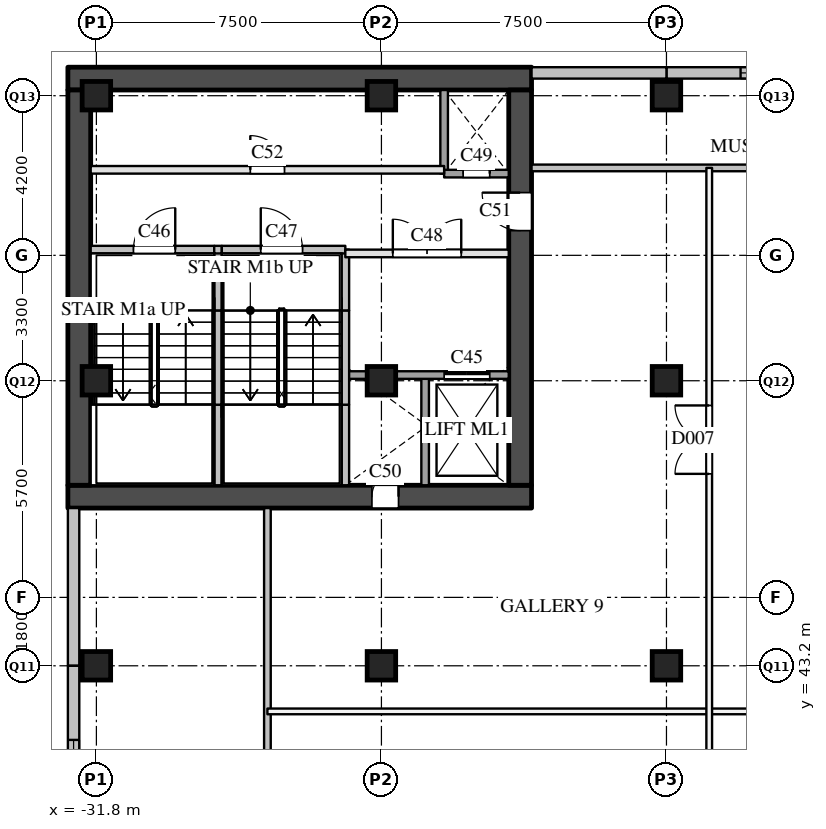
"""IFC4 building model, lengths in metres.
Left out: names, types, materials, properties, quantities, classifications, styles, units other than length and angle.
Written with IfcOpenShell. Run it as: python <this file> out.ifc"""

import sys

from ifc_helpers import new_model, si_unit, direction, frame, frame_2d, origin, origin_2d, place, context, subcontext, project, spatial, rectangle, extrude, element, fill, save


model = new_model("IFC4")
c1 = context("Model", 3, precision=1e-05, world=origin(), true_north=direction((0.0, 1.0)))
c2 = subcontext(c1, "Body", "Model", "MODEL_VIEW")
j1 = project(units=[si_unit("LENGTHUNIT", "METRE"), si_unit("PLANEANGLEUNIT", "RADIAN")], contexts=[c1])
p1 = place(None, origin())
s1 = spatial("IfcSite", under=j1, at=p1, CompositionType="ELEMENT")
p2 = place(p1, origin())
s2 = spatial("IfcBuilding", under=s1, at=p2, CompositionType="ELEMENT")
p3 = place(p2, frame((0.0, 0.0, 8.0)))
s3 = spatial("IfcBuildingStorey", under=s2, at=p3, CompositionType="ELEMENT", Elevation=8.0)
for number, where, z_axis, x_axis in (
    (1, (-31.8, 43.2, 0.0), (0.0, 0.0, 1.0), (1.0, 0.0, 0.0)),
    (2, (-31.8, 50.7, 0.0), (0.0, 0.0, 1.0), (1.0, 0.0, 0.0)),
    (3, (-31.8, 58.2, 0.0), (0.0, 0.0, 1.0), (1.0, 0.0, 0.0)),
    (4, (-24.3, 43.2, 0.0), (0.0, 0.0, 1.0), (1.0, 0.0, 0.0)),
    (5, (-24.3, 50.7, 0.0), (0.0, 0.0, 1.0), (1.0, 0.0, 0.0)),
    (6, (-24.3, 58.2, 0.0), (0.0, 0.0, 1.0), (1.0, 0.0, 0.0)),
    (7, (-16.8, 43.2, 0.0), (0.0, 0.0, 1.0), (1.0, 0.0, 0.0)),
    (8, (-16.8, 50.7, 0.0), (0.0, 0.0, 1.0), (1.0, 0.0, 0.0)),
    (9, (-16.8, 58.2, 0.0), (0.0, 0.0, 1.0), (1.0, 0.0, 0.0)),
):
    element("IfcColumn", number, at=place(p3, frame(where, z_axis=z_axis, x_axis=x_axis)), inside=s3, PredefinedType="COLUMN", context=c2, shape_type="SweptSolid", body=[
        extrude(rectangle(XDim=0.75, YDim=0.75, at=origin_2d()), origin(), (0.0, 0.0, 1.0), 6.0),
    ])
p4 = place(p3, frame((-9.3, 58.8, 0.0), z_axis=(0.0, 0.0, 1.0), x_axis=(-1.0, 0.0, 0.0)))
e10 = element("IfcWall", 10, at=p4, inside=s3, PredefinedType="SOLIDWALL", context=c2, shape_type="SweptSolid", body=[
    extrude(rectangle(XDim=7.5, YDim=0.3, at=frame_2d((3.75, 0.0))), origin(), (0.0, 0.0, 1.0), 5.59),
])
p5 = place(p4, frame((1.95, 0.0, 2.4)))
e11 = element("IfcOpeningElement", 11, at=p5, cuts=e10, PredefinedType="OPENING", context=c2, shape_type="SweptSolid", body=[
    extrude(rectangle(XDim=3.6, YDim=1.2, at=frame_2d((1.8, 0.6))), frame((0.0, 0.16, 0.0), z_axis=(0.0, -1.0, 0.0), x_axis=(1.0, 0.0, 0.0)), (0.0, 0.0, 1.0), 0.32),
])
p6 = place(p3, frame((-16.8, 58.8, 0.0), z_axis=(0.0, 0.0, 1.0), x_axis=(-1.0, 0.0, 0.0)))
e12 = element("IfcWall", 12, at=p6, inside=s3, PredefinedType="SOLIDWALL", context=c2, shape_type="SweptSolid", body=[
    extrude(rectangle(XDim=3.55, YDim=0.3, at=frame_2d((1.775, 0.0))), origin(), (0.0, 0.0, 1.0), 5.59),
])
p7 = place(p3, frame((-32.4, 47.35, 0.0), z_axis=(0.0, 0.0, 1.0), x_axis=(0.0, -1.0, 0.0)))
e13 = element("IfcWall", 13, at=p7, inside=s3, PredefinedType="SOLIDWALL", context=c2, shape_type="SweptSolid", body=[
    extrude(rectangle(XDim=4.15, YDim=0.3, at=frame_2d((2.075, 0.0))), origin(), (0.0, 0.0, 1.0), 5.59),
])
p8 = place(p3, frame((-32.4, 43.2, 0.0), z_axis=(0.0, 0.0, 1.0), x_axis=(0.0, -1.0, 0.0)))
e14 = element("IfcWall", 14, at=p8, inside=s3, PredefinedType="SOLIDWALL", context=c2, shape_type="SweptSolid", body=[
    extrude(rectangle(XDim=7.5, YDim=0.3, at=frame_2d((3.75, 0.0))), origin(), (0.0, 0.0, 1.0), 5.59),
])
p9 = place(p8, frame((1.95, 0.0, 2.4)))
e15 = element("IfcOpeningElement", 15, at=p9, cuts=e14, PredefinedType="OPENING", context=c2, shape_type="SweptSolid", body=[
    extrude(rectangle(XDim=3.6, YDim=1.2, at=frame_2d((1.8, 0.6))), frame((0.0, 0.16, 0.0), z_axis=(0.0, -1.0, 0.0), x_axis=(1.0, 0.0, 0.0)), (0.0, 0.0, 1.0), 0.32),
])
p10 = place(p3, frame((-32.55, 47.65, 0.0), z_axis=(0.0, 0.0, 1.0), x_axis=(1.0, 0.0, 0.0)))
e16 = element("IfcWall", 16, at=p10, inside=s3, PredefinedType="SHEAR", context=c2, shape_type="SweptSolid", body=[
    extrude(rectangle(XDim=12.2, YDim=0.6, at=frame_2d((6.1, 0.0))), origin(), (0.0, 0.0, 1.0), 5.59),
])
p11 = place(p10, frame((8.0, 0.0, 0.0)))
e17 = element("IfcOpeningElement", 17, at=p11, cuts=e16, PredefinedType="OPENING", context=c2, shape_type="SweptSolid", body=[
    extrude(rectangle(XDim=0.7, YDim=2.1, at=frame_2d((0.35, 1.05))), frame((0.0, 0.31, 0.0), z_axis=(0.0, -1.0, 0.0), x_axis=(1.0, 0.0, 0.0)), (0.0, 0.0, 1.0), 0.62),
])
p12 = place(p3, frame((-32.55, 58.65, 0.0), z_axis=(0.0, 0.0, 1.0), x_axis=(1.0, 0.0, 0.0)))
e18 = element("IfcWall", 18, at=p12, inside=s3, PredefinedType="SHEAR", context=c2, shape_type="SweptSolid", body=[
    extrude(rectangle(XDim=12.2, YDim=0.6, at=frame_2d((6.1, 0.0))), origin(), (0.0, 0.0, 1.0), 5.59),
])
p13 = place(p3, frame((-32.25, 47.95, 0.0), z_axis=(0.0, 0.0, 1.0), x_axis=(0.0, 1.0, 0.0)))
e19 = element("IfcWall", 19, at=p13, inside=s3, PredefinedType="SHEAR", context=c2, shape_type="SweptSolid", body=[
    extrude(rectangle(XDim=10.4, YDim=0.6, at=frame_2d((5.2, 0.0))), origin(), (0.0, 0.0, 1.0), 5.59),
])
p14 = place(p3, frame((-20.65, 47.95, 0.0), z_axis=(0.0, 0.0, 1.0), x_axis=(0.0, 1.0, 0.0)))
e20 = element("IfcWall", 20, at=p14, inside=s3, PredefinedType="SHEAR", context=c2, shape_type="SweptSolid", body=[
    extrude(rectangle(XDim=10.4, YDim=0.6, at=frame_2d((5.2, 0.0))), origin(), (0.0, 0.0, 1.0), 5.59),
])
p15 = place(p14, frame((6.7, 0.0, 0.0)))
e21 = element("IfcOpeningElement", 21, at=p15, cuts=e20, PredefinedType="OPENING", context=c2, shape_type="SweptSolid", body=[
    extrude(rectangle(XDim=1.0, YDim=2.1, at=frame_2d((0.5, 1.05))), frame((0.0, 0.31, 0.0), z_axis=(0.0, -1.0, 0.0), x_axis=(1.0, 0.0, 0.0)), (0.0, 0.0, 1.0), 0.62),
])
p16 = place(p3, frame((-28.6, 47.95, 0.0), z_axis=(0.0, 0.0, 1.0), x_axis=(0.0, 1.0, 0.0)))
e22 = element("IfcWall", 22, at=p16, inside=s3, PredefinedType="SOLIDWALL", context=c2, shape_type="SweptSolid", body=[
    extrude(rectangle(XDim=2.12, YDim=0.2, at=frame_2d((1.06, 0.0))), origin(), (0.0, 0.0, 1.0), 5.59),
])
p17 = place(p3, frame((-28.6, 50.07, 0.0), z_axis=(0.0, 0.0, 1.0), x_axis=(0.0, 1.0, 0.0)))
e23 = element("IfcWall", 23, at=p17, inside=s3, PredefinedType="SOLIDWALL", context=c2, shape_type="SweptSolid", body=[
    extrude(rectangle(XDim=2.48, YDim=0.2, at=frame_2d((1.24, 0.0))), origin(), (0.0, 0.0, 1.0), 5.59),
])
p18 = place(p3, frame((-28.6, 52.55, 0.0), z_axis=(0.0, 0.0, 1.0), x_axis=(0.0, 1.0, 0.0)))
e24 = element("IfcWall", 24, at=p18, inside=s3, PredefinedType="SOLIDWALL", context=c2, shape_type="SweptSolid", body=[
    extrude(rectangle(XDim=1.6, YDim=0.2, at=frame_2d((0.8, 0.0))), origin(), (0.0, 0.0, 1.0), 5.59),
])
p19 = place(p3, frame((-25.25, 47.95, 0.0), z_axis=(0.0, 0.0, 1.0), x_axis=(0.0, 1.0, 0.0)))
e25 = element("IfcWall", 25, at=p19, inside=s3, PredefinedType="SOLIDWALL", context=c2, shape_type="SweptSolid", body=[
    extrude(rectangle(XDim=2.12, YDim=0.2, at=frame_2d((1.06, 0.0))), origin(), (0.0, 0.0, 1.0), 5.59),
])
p20 = place(p3, frame((-25.25, 50.07, 0.0), z_axis=(0.0, 0.0, 1.0), x_axis=(0.0, 1.0, 0.0)))
e26 = element("IfcWall", 26, at=p20, inside=s3, PredefinedType="SOLIDWALL", context=c2, shape_type="SweptSolid", body=[
    extrude(rectangle(XDim=2.48, YDim=0.2, at=frame_2d((1.24, 0.0))), origin(), (0.0, 0.0, 1.0), 5.59),
])
p21 = place(p3, frame((-25.25, 52.55, 0.0), z_axis=(0.0, 0.0, 1.0), x_axis=(0.0, 1.0, 0.0)))
e27 = element("IfcWall", 27, at=p21, inside=s3, PredefinedType="SOLIDWALL", context=c2, shape_type="SweptSolid", body=[
    extrude(rectangle(XDim=1.6, YDim=0.2, at=frame_2d((0.8, 0.0))), origin(), (0.0, 0.0, 1.0), 5.59),
])
p22 = place(p3, frame((-23.15, 47.95, 0.0), z_axis=(0.0, 0.0, 1.0), x_axis=(0.0, 1.0, 0.0)))
e28 = element("IfcWall", 28, at=p22, inside=s3, PredefinedType="SOLIDWALL", context=c2, shape_type="SweptSolid", body=[
    extrude(rectangle(XDim=2.9, YDim=0.2, at=frame_2d((1.45, 0.0))), origin(), (0.0, 0.0, 1.0), 5.59),
])
p23 = place(p3, frame((-22.65, 56.15, 0.0), z_axis=(0.0, 0.0, 1.0), x_axis=(0.0, 1.0, 0.0)))
e29 = element("IfcWall", 29, at=p23, inside=s3, PredefinedType="SOLIDWALL", context=c2, shape_type="SweptSolid", body=[
    extrude(rectangle(XDim=2.2, YDim=0.2, at=frame_2d((1.1, 0.0))), origin(), (0.0, 0.0, 1.0), 5.59),
])
p24 = place(p3, frame((-25.25, 50.85, 0.0), z_axis=(0.0, 0.0, 1.0), x_axis=(1.0, 0.0, 0.0)))
e30 = element("IfcWall", 30, at=p24, inside=s3, PredefinedType="SOLIDWALL", context=c2, shape_type="SweptSolid", body=[
    extrude(rectangle(XDim=4.3, YDim=0.2, at=frame_2d((2.15, 0.0))), origin(), (0.0, 0.0, 1.0), 5.59),
])
p25 = place(p24, frame((2.6, 0.0, 0.0)))
e31 = element("IfcOpeningElement", 31, at=p25, cuts=e30, PredefinedType="OPENING", context=c2, shape_type="SweptSolid", body=[
    extrude(rectangle(XDim=1.2, YDim=2.1, at=frame_2d((0.6, 1.05))), frame((0.0, 0.11, 0.0), z_axis=(0.0, -1.0, 0.0), x_axis=(1.0, 0.0, 0.0)), (0.0, 0.0, 1.0), 0.22),
])
p26 = place(p3, frame((-25.25, 54.05, 0.0), z_axis=(0.0, 0.0, 1.0), x_axis=(1.0, 0.0, 0.0)))
e32 = element("IfcWall", 32, at=p26, inside=s3, PredefinedType="PARTITIONING", context=c2, shape_type="SweptSolid", body=[
    extrude(rectangle(XDim=4.3, YDim=0.2, at=frame_2d((2.15, 0.0))), origin(), (0.0, 0.0, 1.0), 5.59),
])
p27 = place(p26, frame((1.25, 0.0, 0.0)))
e33 = element("IfcOpeningElement", 33, at=p27, cuts=e32, PredefinedType="OPENING", context=c2, shape_type="SweptSolid", body=[
    extrude(rectangle(XDim=1.8, YDim=2.1, at=frame_2d((0.9, 1.05))), frame((0.0, 0.11, 0.0), z_axis=(0.0, -1.0, 0.0), x_axis=(1.0, 0.0, 0.0)), (0.0, 0.0, 1.0), 0.22),
])
p28 = place(p3, frame((-31.95, 54.15, 0.0), z_axis=(0.0, 0.0, 1.0), x_axis=(1.0, 0.0, 0.0)))
e34 = element("IfcWall", 34, at=p28, inside=s3, PredefinedType="SOLIDWALL", context=c2, shape_type="SweptSolid", body=[
    extrude(rectangle(XDim=3.25, YDim=0.2, at=frame_2d((1.625, 0.0))), origin(), (0.0, 0.0, 1.0), 5.59),
])
p29 = place(p28, frame((1.125, 0.0, 0.0)))
e35 = element("IfcOpeningElement", 35, at=p29, cuts=e34, PredefinedType="OPENING", context=c2, shape_type="SweptSolid", body=[
    extrude(rectangle(XDim=1.1, YDim=2.1, at=frame_2d((0.55, 1.05))), frame((0.0, 0.11, 0.0), z_axis=(0.0, -1.0, 0.0), x_axis=(1.0, 0.0, 0.0)), (0.0, 0.0, 1.0), 0.22),
])
p30 = place(p3, frame((-28.7, 54.15, 0.0), z_axis=(0.0, 0.0, 1.0), x_axis=(1.0, 0.0, 0.0)))
e36 = element("IfcWall", 36, at=p30, inside=s3, PredefinedType="SOLIDWALL", context=c2, shape_type="SweptSolid", body=[
    extrude(rectangle(XDim=0.2, YDim=0.2, at=frame_2d((0.1, 0.0))), origin(), (0.0, 0.0, 1.0), 5.59),
])
p31 = place(p3, frame((-28.5, 54.15, 0.0), z_axis=(0.0, 0.0, 1.0), x_axis=(1.0, 0.0, 0.0)))
e37 = element("IfcWall", 37, at=p31, inside=s3, PredefinedType="SOLIDWALL", context=c2, shape_type="SweptSolid", body=[
    extrude(rectangle(XDim=3.25, YDim=0.2, at=frame_2d((1.625, 0.0))), origin(), (0.0, 0.0, 1.0), 5.59),
])
p32 = place(p31, frame((1.025, 0.0, 0.0)))
e38 = element("IfcOpeningElement", 38, at=p32, cuts=e37, PredefinedType="OPENING", context=c2, shape_type="SweptSolid", body=[
    extrude(rectangle(XDim=1.1, YDim=2.1, at=frame_2d((0.55, 1.05))), frame((0.0, 0.11, 0.0), z_axis=(0.0, -1.0, 0.0), x_axis=(1.0, 0.0, 0.0)), (0.0, 0.0, 1.0), 0.22),
])
p33 = place(p3, frame((-31.95, 56.25, 0.0), z_axis=(0.0, 0.0, 1.0), x_axis=(1.0, 0.0, 0.0)))
e39 = element("IfcWall", 39, at=p33, inside=s3, PredefinedType="PARTITIONING", context=c2, shape_type="SweptSolid", body=[
    extrude(rectangle(XDim=9.3, YDim=0.2, at=frame_2d((4.65, 0.0))), origin(), (0.0, 0.0, 1.0), 5.59),
])
p34 = place(p33, frame((4.2, 0.0, 0.0)))
e40 = element("IfcOpeningElement", 40, at=p34, cuts=e39, PredefinedType="OPENING", context=c2, shape_type="SweptSolid", body=[
    extrude(rectangle(XDim=0.9, YDim=2.1, at=frame_2d((0.45, 1.05))), frame((0.0, 0.11, 0.0), z_axis=(0.0, -1.0, 0.0), x_axis=(1.0, 0.0, 0.0)), (0.0, 0.0, 1.0), 0.22),
])
p35 = place(p3, frame((-22.65, 56.15, 0.0), z_axis=(0.0, 0.0, 1.0), x_axis=(1.0, 0.0, 0.0)))
e41 = element("IfcWall", 41, at=p35, inside=s3, PredefinedType="SOLIDWALL", context=c2, shape_type="SweptSolid", body=[
    extrude(rectangle(XDim=1.7, YDim=0.2, at=frame_2d((0.85, 0.0))), origin(), (0.0, 0.0, 1.0), 5.59),
])
p36 = place(p35, frame((0.5, 0.0, 0.0)))
e42 = element("IfcOpeningElement", 42, at=p36, cuts=e41, PredefinedType="OPENING", context=c2, shape_type="SweptSolid", body=[
    extrude(rectangle(XDim=0.7, YDim=2.1, at=frame_2d((0.35, 1.05))), frame((0.0, 0.11, 0.0), z_axis=(0.0, -1.0, 0.0), x_axis=(1.0, 0.0, 0.0)), (0.0, 0.0, 1.0), 0.22),
])
p37 = place(p3, frame((-20.35, 56.3, 0.0), z_axis=(0.0, 0.0, 1.0), x_axis=(1.0, 0.0, 0.0)))
e43 = element("IfcWall", 43, at=p37, inside=s3, PredefinedType="PARTITIONING", context=c2, shape_type="SweptSolid", body=[
    extrude(rectangle(XDim=16.3, YDim=0.175, at=frame_2d((8.15, 0.0))), origin(), (0.0, 0.0, 1.0), 4.79),
])
p38 = place(p3, frame((-27.3, 30.0, 0.0), z_axis=(0.0, 0.0, 1.0), x_axis=(0.0, 1.0, 0.0)))
e44 = element("IfcWall", 44, at=p38, inside=s3, PredefinedType="PARTITIONING", context=c2, shape_type="SweptSolid", body=[
    extrude(rectangle(XDim=17.35, YDim=0.175, at=frame_2d((8.675, 0.0))), origin(), (0.0, 0.0, 1.0), 4.79),
])
p39 = place(p38, frame((5.1, 0.0, 0.0)))
e45 = element("IfcOpeningElement", 45, at=p39, cuts=e44, PredefinedType="OPENING", context=c2, shape_type="SweptSolid", body=[
    extrude(rectangle(XDim=1.8, YDim=2.1, at=frame_2d((0.9, 1.05))), frame((0.0, 0.097, 0.0), z_axis=(0.0, -1.0, 0.0), x_axis=(1.0, 0.0, 0.0)), (0.0, 0.0, 1.0), 0.195),
])
p40 = place(p3, frame((-27.3, 42.0, 0.0), z_axis=(0.0, 0.0, 1.0), x_axis=(1.0, 0.0, 0.0)))
e46 = element("IfcWall", 46, at=p40, inside=s3, PredefinedType="PARTITIONING", context=c2, shape_type="SweptSolid", body=[
    extrude(rectangle(XDim=23.25, YDim=0.15, at=frame_2d((11.625, 0.0))), origin(), (0.0, 0.0, 1.0), 4.79),
])
p41 = place(p3, frame((-15.675, 30.0, 0.0), z_axis=(0.0, 0.0, 1.0), x_axis=(0.0, 1.0, 0.0)))
e47 = element("IfcWall", 47, at=p41, inside=s3, PredefinedType="PARTITIONING", context=c2, shape_type="SweptSolid", body=[
    extrude(rectangle(XDim=26.3, YDim=0.15, at=frame_2d((13.15, 0.0))), origin(), (0.0, 0.0, 1.0), 4.79),
])
p42 = place(p41, frame((18.25, 0.0, 0.0)))
e48 = element("IfcOpeningElement", 48, at=p42, cuts=e47, PredefinedType="OPENING", context=c2, shape_type="SweptSolid", body=[
    extrude(rectangle(XDim=1.8, YDim=2.1, at=frame_2d((0.9, 1.05))), frame((0.0, 0.085, 0.0), z_axis=(0.0, -1.0, 0.0), x_axis=(1.0, 0.0, 0.0)), (0.0, 0.0, 1.0), 0.17),
])
p43 = place(p41, frame((7.04, 0.0, 0.0)))
e49 = element("IfcOpeningElement", 49, at=p43, cuts=e47, PredefinedType="OPENING", context=c2, shape_type="SweptSolid", body=[
    extrude(rectangle(XDim=1.8, YDim=2.1, at=frame_2d((0.9, 1.05))), frame((0.0, 0.085, 0.0), z_axis=(0.0, -1.0, 0.0), x_axis=(1.0, 0.0, 0.0)), (0.0, 0.0, 1.0), 0.17),
])
p44 = place(p5, origin())
e50 = element("IfcWindow", 50, at=p44, inside=s3, PartitioningType="SINGLE_PANEL", PredefinedType="WINDOW", context=c2, shape_type="SweptSolid", body=[
    extrude(rectangle(XDim=3.6, YDim=1.2, at=frame_2d((1.8, 0.6))), frame((0.0, 0.03, 0.0), z_axis=(0.0, -1.0, 0.0), x_axis=(1.0, 0.0, 0.0)), (0.0, 0.0, 1.0), 0.06),
])
fill(e11, e50)
p45 = place(p9, origin())
e51 = element("IfcWindow", 51, at=p45, inside=s3, PartitioningType="SINGLE_PANEL", PredefinedType="WINDOW", context=c2, shape_type="SweptSolid", body=[
    extrude(rectangle(XDim=3.6, YDim=1.2, at=frame_2d((1.8, 0.6))), frame((0.0, 0.03, 0.0), z_axis=(0.0, -1.0, 0.0), x_axis=(1.0, 0.0, 0.0)), (0.0, 0.0, 1.0), 0.06),
])
fill(e15, e51)
p46 = place(p25, origin())
e52 = element("IfcDoor", 52, at=p46, inside=s3, OperationType="SLIDING_TO_LEFT", PredefinedType="DOOR", context=c2, shape_type="SweptSolid", body=[
    extrude(rectangle(XDim=1.2, YDim=2.1, at=frame_2d((0.6, 1.05))), frame((0.0, 0.025, 0.0), z_axis=(0.0, -1.0, 0.0), x_axis=(1.0, 0.0, 0.0)), (0.0, 0.0, 1.0), 0.05),
])
fill(e31, e52)
p47 = place(p29, origin())
e53 = element("IfcDoor", 53, at=p47, inside=s3, OperationType="SINGLE_SWING_RIGHT", PredefinedType="DOOR", context=c2, shape_type="SweptSolid", body=[
    extrude(rectangle(XDim=1.1, YDim=2.1, at=frame_2d((0.55, 1.05))), frame((0.0, 0.025, 0.0), z_axis=(0.0, -1.0, 0.0), x_axis=(1.0, 0.0, 0.0)), (0.0, 0.0, 1.0), 0.05),
])
fill(e35, e53)
p48 = place(p32, origin())
e54 = element("IfcDoor", 54, at=p48, inside=s3, OperationType="SINGLE_SWING_LEFT", PredefinedType="DOOR", context=c2, shape_type="SweptSolid", body=[
    extrude(rectangle(XDim=1.1, YDim=2.1, at=frame_2d((0.55, 1.05))), frame((0.0, 0.025, 0.0), z_axis=(0.0, -1.0, 0.0), x_axis=(1.0, 0.0, 0.0)), (0.0, 0.0, 1.0), 0.05),
])
fill(e38, e54)
p49 = place(p27, origin())
e55 = element("IfcDoor", 55, at=p49, inside=s3, OperationType="DOUBLE_DOOR_SINGLE_SWING", PredefinedType="DOOR", context=c2, shape_type="SweptSolid", body=[
    extrude(rectangle(XDim=1.8, YDim=2.1, at=frame_2d((0.9, 1.05))), frame((0.0, 0.025, 0.0), z_axis=(0.0, -1.0, 0.0), x_axis=(1.0, 0.0, 0.0)), (0.0, 0.0, 1.0), 0.05),
])
fill(e33, e55)
p50 = place(p36, origin())
e56 = element("IfcDoor", 56, at=p50, inside=s3, OperationType="SINGLE_SWING_RIGHT", PredefinedType="DOOR", context=c2, shape_type="SweptSolid", body=[
    extrude(rectangle(XDim=0.7, YDim=2.1, at=frame_2d((0.35, 1.05))), frame((0.0, 0.025, 0.0), z_axis=(0.0, -1.0, 0.0), x_axis=(1.0, 0.0, 0.0)), (0.0, 0.0, 1.0), 0.05),
])
fill(e42, e56)
p51 = place(p11, origin())
e57 = element("IfcDoor", 57, at=p51, inside=s3, OperationType="SINGLE_SWING_RIGHT", PredefinedType="DOOR", context=c2, shape_type="SweptSolid", body=[
    extrude(rectangle(XDim=0.7, YDim=2.1, at=frame_2d((0.35, 1.05))), frame((0.0, 0.025, 0.0), z_axis=(0.0, -1.0, 0.0), x_axis=(1.0, 0.0, 0.0)), (0.0, 0.0, 1.0), 0.05),
])
fill(e17, e57)
p52 = place(p15, origin())
e58 = element("IfcDoor", 58, at=p52, inside=s3, OperationType="SINGLE_SWING_RIGHT", PredefinedType="DOOR", context=c2, shape_type="SweptSolid", body=[
    extrude(rectangle(XDim=1.0, YDim=2.1, at=frame_2d((0.5, 1.05))), frame((0.0, 0.025, 0.0), z_axis=(0.0, -1.0, 0.0), x_axis=(1.0, 0.0, 0.0)), (0.0, 0.0, 1.0), 0.05),
])
fill(e21, e58)
p53 = place(p34, origin())
e59 = element("IfcDoor", 59, at=p53, inside=s3, OperationType="SINGLE_SWING_LEFT", PredefinedType="DOOR", context=c2, shape_type="SweptSolid", body=[
    extrude(rectangle(XDim=0.9, YDim=2.1, at=frame_2d((0.45, 1.05))), frame((0.0, 0.025, 0.0), z_axis=(0.0, -1.0, 0.0), x_axis=(1.0, 0.0, 0.0)), (0.0, 0.0, 1.0), 0.05),
])
fill(e40, e59)
p54 = place(p42, origin())
e60 = element("IfcDoor", 60, at=p54, inside=s3, OperationType="DOUBLE_DOOR_SINGLE_SWING", PredefinedType="DOOR", context=c2, shape_type="SweptSolid", body=[
    extrude(rectangle(XDim=1.8, YDim=2.1, at=frame_2d((0.9, 1.05))), frame((0.0, 0.025, 0.0), z_axis=(0.0, -1.0, 0.0), x_axis=(1.0, 0.0, 0.0)), (0.0, 0.0, 1.0), 0.05),
])
fill(e48, e60)
save(model, sys.argv[1])
